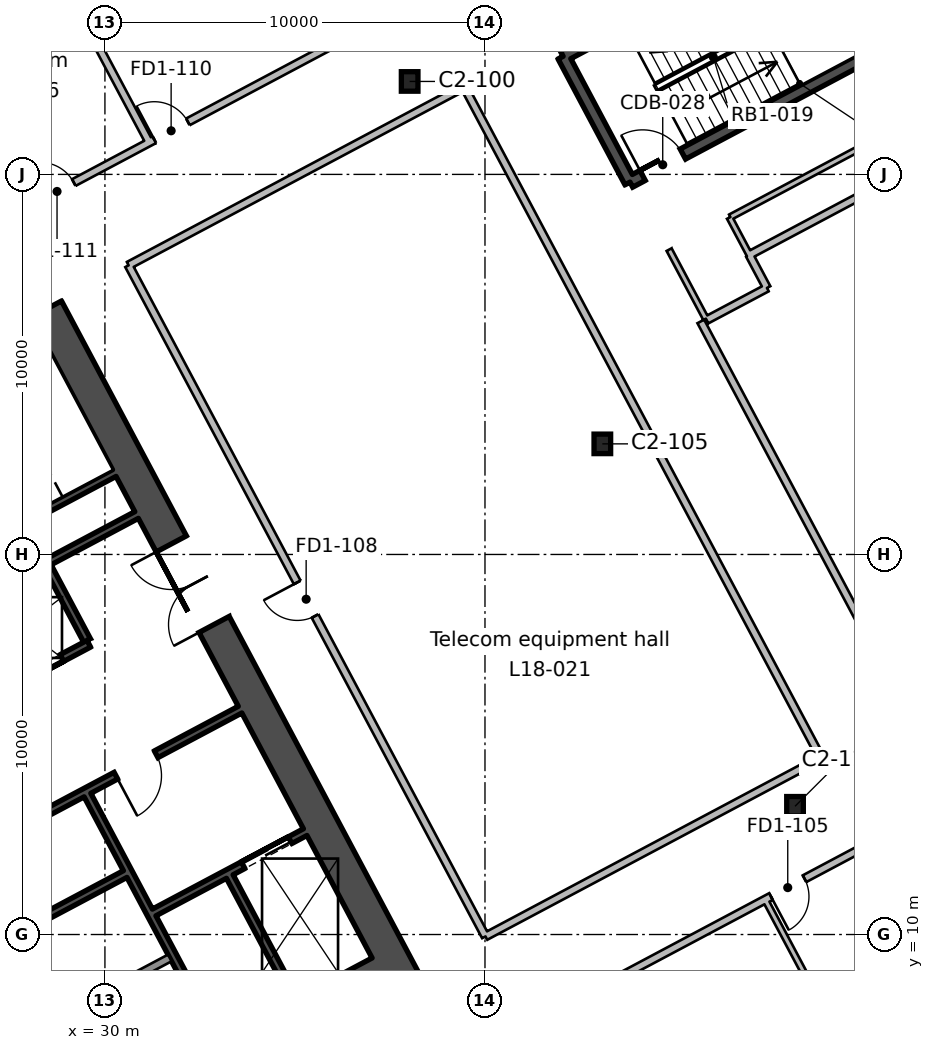
"""IFC4 building model, lengths in metres.
Left out: names, types, materials, properties, quantities, classifications, styles, units other than length and angle.
Written with IfcOpenShell. Run it as: python <this file> out.ifc"""

import sys

from ifc_helpers import new_model, si_unit, direction, frame, frame_2d, origin, origin_2d, place, context, subcontext, project, spatial, rectangle, i_section, extrude, element, fill, save


model = new_model("IFC4")
c1 = context("Model", 3, precision=1e-05, world=origin(), true_north=direction((0.0, 1.0)))
c2 = subcontext(c1, "Body", "Model", "MODEL_VIEW")
j1 = project(units=[si_unit("LENGTHUNIT", "METRE"), si_unit("PLANEANGLEUNIT", "RADIAN")], contexts=[c1])
p1 = place(None, origin())
s1 = spatial("IfcSite", under=j1, at=p1, CompositionType="ELEMENT")
p2 = place(p1, origin())
s2 = spatial("IfcBuilding", under=s1, at=p2, CompositionType="ELEMENT")
p3 = place(p2, frame((0.0, 0.0, 93.8)))
s3 = spatial("IfcBuildingStorey", under=s2, at=p3, CompositionType="ELEMENT", Elevation=93.8)
for number, where, z_axis, x_axis in (
    (1, (48.158, 13.374, 0.0), (0.0, 0.0, 1.0), (1.0, 0.0, 0.0)),
    (2, (43.088, 22.91, 0.0), (0.0, 0.0, 1.0), (1.0, 0.0, 0.0)),
    (3, (38.018, 32.446, 0.0), (0.0, 0.0, 1.0), (1.0, 0.0, 0.0)),
):
    element("IfcColumn", number, at=place(p3, frame(where, z_axis=z_axis, x_axis=x_axis)), inside=s3, PredefinedType="COLUMN", context=c2, shape_type="SweptSolid", body=[
        extrude(i_section(OverallWidth=0.437, OverallDepth=0.513, WebThickness=0.061, FlangeThickness=0.097, FilletRadius=0.015, at=origin_2d()), origin(), (0.0, 0.0, 1.0), 4.6),
    ])
p4 = place(p3, frame((37.849, 8.799, 0.0), z_axis=(0.0, 0.0, 1.0), x_axis=(-0.469465789982, 0.882950662289, 0.0)))
e4 = element("IfcWall", 4, at=p4, inside=s3, PredefinedType="SHEAR", context=c2, shape_type="SweptSolid", body=[
    extrude(rectangle(XDim=20.0, YDim=0.9, at=frame_2d((10.0, 0.0))), origin(), (0.0, 0.0, 1.0), 4.6),
])
p5 = place(p4, frame((10.6, 0.0, 0.0)))
e5 = element("IfcOpeningElement", 5, at=p5, cuts=e4, PredefinedType="OPENING", context=c2, shape_type="SweptSolid", body=[
    extrude(rectangle(XDim=2.4, YDim=2.4, at=frame_2d((1.2, 1.2))), frame((0.0, 0.46, 0.0), z_axis=(0.0, -1.0, 0.0), x_axis=(1.0, 0.0, 0.0)), (0.0, 0.0, 1.0), 0.92),
])
p6 = place(p3, frame((19.405, -0.498, 0.0), z_axis=(0.0, 0.0, 1.0), x_axis=(0.88294509198, 0.469476266226, 0.0)))
e6 = element("IfcWall", 6, at=p6, inside=s3, PredefinedType="SHEAR", context=c2, shape_type="SweptSolid", body=[
    extrude(rectangle(XDim=20.2, YDim=0.9, at=frame_2d((10.1, 0.0))), origin(), (0.0, 0.0, 1.0), 4.6),
])
p7 = place(p3, frame((32.968, 7.223, 0.0), z_axis=(0.0, 0.0, 1.0), x_axis=(-0.469480409012, 0.88294288918, 0.0)))
e7 = element("IfcWall", 7, at=p7, inside=s3, PredefinedType="SHEAR", context=c2, shape_type="SweptSolid", body=[
    extrude(rectangle(XDim=7.3, YDim=0.2, at=frame_2d((3.65, 0.0))), origin(), (0.0, 0.0, 1.0), 4.6),
])
p8 = place(p3, frame((29.528, 17.739, 0.0), z_axis=(0.0, 0.0, 1.0), x_axis=(-0.469401318492, 0.882984938828, 0.0)))
e8 = element("IfcWall", 8, at=p8, inside=s3, PredefinedType="SHEAR", context=c2, shape_type="SweptSolid", body=[
    extrude(rectangle(XDim=2.2, YDim=0.2, at=frame_2d((1.1, 0.0))), origin(), (0.0, 0.0, 1.0), 4.6),
])
p9 = place(p3, frame((34.999, 8.303, 0.0), z_axis=(0.0, 0.0, 1.0), x_axis=(-0.4694665462, 0.882950260207, 0.0)))
e9 = element("IfcWall", 9, at=p9, inside=s3, PredefinedType="SHEAR", context=c2, shape_type="SweptSolid", body=[
    extrude(rectangle(XDim=3.65, YDim=0.2, at=frame_2d((1.825, 0.0))), origin(), (0.0, 0.0, 1.0), 4.6),
])
p10 = place(p3, frame((27.115, 6.942, 0.0), z_axis=(0.0, 0.0, 1.0), x_axis=(0.882934506056, 0.469496174655, 0.0)))
e10 = element("IfcWall", 10, at=p10, inside=s3, PredefinedType="SOLIDWALL", context=c2, shape_type="SweptSolid", body=[
    extrude(rectangle(XDim=5.2, YDim=0.2, at=frame_2d((2.6, 0.0))), origin(), (0.0, 0.0, 1.0), 4.6),
])
p11 = place(p3, frame((31.296, 10.581, 0.0), z_axis=(0.0, 0.0, 1.0), x_axis=(0.882960433586, 0.469447412093, 0.0)))
e11 = element("IfcWall", 11, at=p11, inside=s3, PredefinedType="SHEAR", context=c2, shape_type="SweptSolid", body=[
    extrude(rectangle(XDim=4.5, YDim=0.2, at=frame_2d((2.25, 0.0))), origin(), (0.0, 0.0, 1.0), 4.6),
])
p12 = place(p11, frame((2.65, 0.0, 0.0)))
e12 = element("IfcOpeningElement", 12, at=p12, cuts=e11, PredefinedType="OPENING", context=c2, shape_type="SweptSolid", body=[
    extrude(rectangle(XDim=1.4, YDim=2.4, at=frame_2d((0.7, 1.2))), frame((0.0, 0.11, 0.0), z_axis=(0.0, -1.0, 0.0), x_axis=(1.0, 0.0, 0.0)), (0.0, 0.0, 1.0), 0.22),
])
p13 = place(p3, frame((25.941, 9.15, 0.0), z_axis=(0.0, 0.0, 1.0), x_axis=(0.882953967957, 0.469459572775, 0.0)))
e13 = element("IfcWall", 13, at=p13, inside=s3, PredefinedType="SHEAR", context=c2, shape_type="SweptSolid", body=[
    extrude(rectangle(XDim=5.2, YDim=0.2, at=frame_2d((2.6, 0.0))), origin(), (0.0, 0.0, 1.0), 4.6),
])
p14 = place(p3, frame((24.726, 11.222, 0.0), z_axis=(0.0, 0.0, 1.0), x_axis=(0.882940221191, 0.469485426614, 0.0)))
e14 = element("IfcWall", 14, at=p14, inside=s3, PredefinedType="SHEAR", context=c2, shape_type="SweptSolid", body=[
    extrude(rectangle(XDim=10.0, YDim=0.2, at=frame_2d((5.0, 0.0))), origin(), (0.0, 0.0, 1.0), 4.6),
])
p15 = place(p14, frame((6.3, 0.0, 0.0)))
e15 = element("IfcOpeningElement", 15, at=p15, cuts=e14, PredefinedType="OPENING", context=c2, shape_type="SweptSolid", body=[
    extrude(rectangle(XDim=1.2, YDim=2.1, at=frame_2d((0.6, 1.05))), frame((0.0, 0.11, 0.0), z_axis=(0.0, -1.0, 0.0), x_axis=(1.0, 0.0, 0.0)), (0.0, 0.0, 1.0), 0.22),
])
p16 = place(p14, frame((0.36, 0.0, 0.0)))
e16 = element("IfcOpeningElement", 16, at=p16, cuts=e14, PredefinedType="OPENING", context=c2, shape_type="SweptSolid", body=[
    extrude(rectangle(XDim=0.9, YDim=2.1, at=frame_2d((0.45, 1.05))), frame((0.0, 0.11, 0.0), z_axis=(0.0, -1.0, 0.0), x_axis=(1.0, 0.0, 0.0)), (0.0, 0.0, 1.0), 0.22),
])
p17 = place(p14, frame((3.06, 0.0, 0.0)))
e17 = element("IfcOpeningElement", 17, at=p17, cuts=e14, PredefinedType="OPENING", context=c2, shape_type="SweptSolid", body=[
    extrude(rectangle(XDim=0.9, YDim=2.1, at=frame_2d((0.45, 1.05))), frame((0.0, 0.11, 0.0), z_axis=(0.0, -1.0, 0.0), x_axis=(1.0, 0.0, 0.0)), (0.0, 0.0, 1.0), 0.22),
])
p18 = place(p3, frame((24.807, 15.116, 0.0), z_axis=(0.0, 0.0, 1.0), x_axis=(0.882942972946, 0.469480251476, 0.0)))
e18 = element("IfcWall", 18, at=p18, inside=s3, PredefinedType="SHEAR", context=c2, shape_type="SweptSolid", body=[
    extrude(rectangle(XDim=5.4, YDim=0.2, at=frame_2d((2.7, 0.0))), origin(), (0.0, 0.0, 1.0), 4.6),
])
p19 = place(p18, frame((0.8, 0.0, 0.0)))
e19 = element("IfcOpeningElement", 19, at=p19, cuts=e18, PredefinedType="OPENING", context=c2, shape_type="SweptSolid", body=[
    extrude(rectangle(XDim=1.1, YDim=2.1, at=frame_2d((0.55, 1.05))), frame((0.0, 0.11, 0.0), z_axis=(0.0, -1.0, 0.0), x_axis=(1.0, 0.0, 0.0)), (0.0, 0.0, 1.0), 0.22),
])
p20 = place(p18, frame((3.5, 0.0, 0.0)))
e20 = element("IfcOpeningElement", 20, at=p20, cuts=e18, PredefinedType="OPENING", context=c2, shape_type="SweptSolid", body=[
    extrude(rectangle(XDim=1.1, YDim=2.1, at=frame_2d((0.55, 1.05))), frame((0.0, 0.11, 0.0), z_axis=(0.0, -1.0, 0.0), x_axis=(1.0, 0.0, 0.0)), (0.0, 0.0, 1.0), 0.22),
])
p21 = place(p3, frame((23.769, 17.282, 0.0), z_axis=(0.0, 0.0, 1.0), x_axis=(0.882940221191, 0.469485426614, 0.0)))
e21 = element("IfcWall", 21, at=p21, inside=s3, PredefinedType="SHEAR", context=c2, shape_type="SweptSolid", body=[
    extrude(rectangle(XDim=8.0, YDim=0.2, at=frame_2d((4.0, 0.0))), origin(), (0.0, 0.0, 1.0), 4.6),
])
p22 = place(p3, frame((23.182, 18.385, 0.0), z_axis=(0.0, 0.0, 1.0), x_axis=(0.88295287151, 0.469461634952, 0.0)))
e22 = element("IfcWall", 22, at=p22, inside=s3, PredefinedType="SHEAR", context=c2, shape_type="SweptSolid", body=[
    extrude(rectangle(XDim=8.0, YDim=0.2, at=frame_2d((4.0, 0.0))), origin(), (0.0, 0.0, 1.0), 4.6),
])
p23 = place(p3, frame((51.145, 33.693, 0.0), z_axis=(0.0, 0.0, 1.0), x_axis=(-0.882945809314, -0.469474917132, 0.0)))
e23 = element("IfcWall", 23, at=p23, inside=s3, PredefinedType="SHEAR", context=c2, shape_type="SweptSolid", body=[
    extrude(rectangle(XDim=8.3, YDim=0.3, at=frame_2d((4.15, 0.0))), origin(), (0.0, 0.0, 1.0), 4.6),
])
p24 = place(p23, frame((6.725, 0.0, 0.0)))
e24 = element("IfcOpeningElement", 24, at=p24, cuts=e23, PredefinedType="OPENING", context=c2, shape_type="SweptSolid", body=[
    extrude(rectangle(XDim=1.2, YDim=2.1, at=frame_2d((0.6, 1.05))), frame((0.0, 0.16, 0.0), z_axis=(0.0, -1.0, 0.0), x_axis=(1.0, 0.0, 0.0)), (0.0, 0.0, 1.0), 0.32),
])
p25 = place(p3, frame((43.816, 29.796, 0.0), z_axis=(0.0, 0.0, 1.0), x_axis=(-0.46946936446, 0.882948761726, 0.0)))
e25 = element("IfcWall", 25, at=p25, inside=s3, PredefinedType="SHEAR", context=c2, shape_type="SweptSolid", body=[
    extrude(rectangle(XDim=3.75, YDim=0.3, at=frame_2d((1.875, 0.0))), origin(), (0.0, 0.0, 1.0), 4.6),
])
p26 = place(p3, frame((42.055, 33.107, 0.0), z_axis=(0.0, 0.0, 1.0), x_axis=(0.882945809314, 0.469474917132, 0.0)))
e26 = element("IfcWall", 26, at=p26, inside=s3, PredefinedType="SHEAR", context=c2, shape_type="SweptSolid", body=[
    extrude(rectangle(XDim=8.3, YDim=0.3, at=frame_2d((4.15, 0.0))), origin(), (0.0, 0.0, 1.0), 4.6),
])
p27 = place(p3, frame((0.0, 14.27, 0.0), z_axis=(0.0, 0.0, 1.0), x_axis=(0.882946949892, 0.46947277203, 0.0)))
e27 = element("IfcWall", 27, at=p27, inside=s3, PredefinedType="PARTITIONING", context=c2, shape_type="SweptSolid", body=[
    extrude(rectangle(XDim=65.501, YDim=0.2, at=frame_2d((32.75, 0.0))), origin(), (0.0, 0.0, 1.0), 4.2),
])
p28 = place(p27, frame((35.45, 0.0, 0.0)))
e28 = element("IfcOpeningElement", 28, at=p28, cuts=e27, PredefinedType="OPENING", context=c2, shape_type="SweptSolid", body=[
    extrude(rectangle(XDim=1.0, YDim=2.1, at=frame_2d((0.5, 1.05))), frame((0.0, 0.11, 0.0), z_axis=(0.0, -1.0, 0.0), x_axis=(1.0, 0.0, 0.0)), (0.0, 0.0, 1.0), 0.22),
])
p29 = place(p27, frame((32.05, 0.0, 0.0)))
e29 = element("IfcOpeningElement", 29, at=p29, cuts=e27, PredefinedType="OPENING", context=c2, shape_type="SweptSolid", body=[
    extrude(rectangle(XDim=1.0, YDim=2.1, at=frame_2d((0.5, 1.05))), frame((0.0, 0.11, 0.0), z_axis=(0.0, -1.0, 0.0), x_axis=(1.0, 0.0, 0.0)), (0.0, 0.0, 1.0), 0.22),
])
p30 = place(p27, frame((29.65, 0.0, 0.0)))
e30 = element("IfcOpeningElement", 30, at=p30, cuts=e27, PredefinedType="OPENING", context=c2, shape_type="SweptSolid", body=[
    extrude(rectangle(XDim=1.0, YDim=2.1, at=frame_2d((0.5, 1.05))), frame((0.0, 0.11, 0.0), z_axis=(0.0, -1.0, 0.0), x_axis=(1.0, 0.0, 0.0)), (0.0, 0.0, 1.0), 0.22),
])
p31 = place(p27, frame((13.85, 0.0, 0.0)))
e31 = element("IfcOpeningElement", 31, at=p31, cuts=e27, PredefinedType="OPENING", context=c2, shape_type="SweptSolid", body=[
    extrude(rectangle(XDim=1.0, YDim=2.1, at=frame_2d((0.5, 1.05))), frame((0.0, 0.11, 0.0), z_axis=(0.0, -1.0, 0.0), x_axis=(1.0, 0.0, 0.0)), (0.0, 0.0, 1.0), 0.22),
])
p32 = place(p3, frame((57.105, 16.093, 0.0), z_axis=(0.0, 0.0, 1.0), x_axis=(-0.882946553343, -0.469473517827, 0.0)))
e32 = element("IfcWall", 32, at=p32, inside=s3, PredefinedType="PARTITIONING", context=c2, shape_type="SweptSolid", body=[
    extrude(rectangle(XDim=49.272, YDim=0.2, at=frame_2d((24.636, 0.0))), origin(), (0.0, 0.0, 1.0), 4.2),
])
p33 = place(p32, frame((27.75, 0.0, 0.0)))
e33 = element("IfcOpeningElement", 33, at=p33, cuts=e32, PredefinedType="OPENING", context=c2, shape_type="SweptSolid", body=[
    extrude(rectangle(XDim=1.0, YDim=2.1, at=frame_2d((0.5, 1.05))), frame((0.0, 0.11, 0.0), z_axis=(0.0, -1.0, 0.0), x_axis=(1.0, 0.0, 0.0)), (0.0, 0.0, 1.0), 0.22),
])
p34 = place(p32, frame((24.15, 0.0, 0.0)))
e34 = element("IfcOpeningElement", 34, at=p34, cuts=e32, PredefinedType="OPENING", context=c2, shape_type="SweptSolid", body=[
    extrude(rectangle(XDim=1.0, YDim=2.1, at=frame_2d((0.5, 1.05))), frame((0.0, 0.11, 0.0), z_axis=(0.0, -1.0, 0.0), x_axis=(1.0, 0.0, 0.0)), (0.0, 0.0, 1.0), 0.22),
])
p35 = place(p32, frame((9.85, 0.0, 0.0)))
e35 = element("IfcOpeningElement", 35, at=p35, cuts=e32, PredefinedType="OPENING", context=c2, shape_type="SweptSolid", body=[
    extrude(rectangle(XDim=1.0, YDim=2.1, at=frame_2d((0.5, 1.05))), frame((0.0, 0.11, 0.0), z_axis=(0.0, -1.0, 0.0), x_axis=(1.0, 0.0, 0.0)), (0.0, 0.0, 1.0), 0.22),
])
p36 = place(p3, frame((31.16, 30.858, 0.0), z_axis=(0.0, 0.0, 1.0), x_axis=(-0.469406117912, 0.882982387404, 0.0)))
e36 = element("IfcWall", 36, at=p36, inside=s3, PredefinedType="PARTITIONING", context=c2, shape_type="SweptSolid", body=[
    extrude(rectangle(XDim=5.383, YDim=0.2, at=frame_2d((2.691, 0.0))), origin(), (0.0, 0.0, 1.0), 4.2),
])
p37 = place(p3, frame((47.372, 10.918, 0.0), z_axis=(0.0, 0.0, 1.0), x_axis=(0.469298440423, -0.883039621884, 0.0)))
e37 = element("IfcWall", 37, at=p37, inside=s3, PredefinedType="PARTITIONING", context=c2, shape_type="SweptSolid", body=[
    extrude(rectangle(XDim=8.6, YDim=0.15, at=frame_2d((4.3, 0.0))), origin(), (0.0, 0.0, 1.0), 4.2),
])
p38 = place(p3, frame((45.811, 26.202, 0.0), z_axis=(0.0, 0.0, 1.0), x_axis=(-0.469172559653, 0.883106510716, 0.0)))
e38 = element("IfcWall", 38, at=p38, inside=s3, PredefinedType="PARTITIONING", context=c2, shape_type="SweptSolid", body=[
    extrude(rectangle(XDim=2.06, YDim=0.15, at=frame_2d((1.03, 0.0))), origin(), (0.0, 0.0, 1.0), 4.2),
])
p39 = place(p3, frame((45.679, 26.132, 0.0), z_axis=(0.0, 0.0, 1.0), x_axis=(0.469471943685, -0.882947390331, 0.0)))
e39 = element("IfcWall", 39, at=p39, inside=s3, PredefinedType="PARTITIONING", context=c2, shape_type="SweptSolid", body=[
    extrude(rectangle(XDim=11.628, YDim=0.2, at=frame_2d((5.814, 0.0))), origin(), (0.0, 0.0, 1.0), 4.2),
])
p40 = place(p3, frame((46.958, 27.881, 0.0), z_axis=(0.0, 0.0, 1.0), x_axis=(0.469300305861, -0.883038630479, 0.0)))
e40 = element("IfcWall", 40, at=p40, inside=s3, PredefinedType="PARTITIONING", context=c2, shape_type="SweptSolid", body=[
    extrude(rectangle(XDim=0.984, YDim=0.2, at=frame_2d((0.492, 0.0))), origin(), (0.0, 0.0, 1.0), 4.2),
])
p41 = place(p3, frame((47.42, 27.012, 0.0), z_axis=(0.0, 0.0, 1.0), x_axis=(-0.88313680222, -0.46911553861, 0.0)))
e41 = element("IfcWall", 41, at=p41, inside=s3, PredefinedType="PARTITIONING", context=c2, shape_type="SweptSolid", body=[
    extrude(rectangle(XDim=1.799, YDim=0.2, at=frame_2d((0.899, 0.0))), origin(), (0.0, 0.0, 1.0), 4.2),
])
p42 = place(p3, frame((52.239, 31.953, 0.0), z_axis=(0.0, 0.0, 1.0), x_axis=(-0.882908561856, -0.469544962065, 0.0)))
e42 = element("IfcWall", 42, at=p42, inside=s3, PredefinedType="PARTITIONING", context=c2, shape_type="SweptSolid", body=[
    extrude(rectangle(XDim=6.549, YDim=0.15, at=frame_2d((3.274, 0.0))), origin(), (0.0, 0.0, 1.0), 4.2),
])
p43 = place(p3, frame((46.434, 28.866, 0.0), z_axis=(0.0, 0.0, 1.0), x_axis=(0.469656526593, -0.882849221005, 0.0)))
e43 = element("IfcWall", 43, at=p43, inside=s3, PredefinedType="PARTITIONING", context=c2, shape_type="SweptSolid", body=[
    extrude(rectangle(XDim=1.115, YDim=0.15, at=frame_2d((0.558, 0.0))), origin(), (0.0, 0.0, 1.0), 4.2),
])
p44 = place(p3, frame((62.542, 36.166, 0.0), z_axis=(0.0, 0.0, 1.0), x_axis=(-0.8829766993, -0.469416817438, 0.0)))
e44 = element("IfcWall", 44, at=p44, inside=s3, PredefinedType="PARTITIONING", context=c2, shape_type="SweptSolid", body=[
    extrude(rectangle(XDim=17.649, YDim=0.2, at=frame_2d((8.825, 0.0))), origin(), (0.0, 0.0, 1.0), 4.2),
])
p45 = place(p3, frame((30.623, 27.608, 0.0), z_axis=(0.0, 0.0, 1.0), x_axis=(0.882940863385, 0.469484218867, 0.0)))
e45 = element("IfcWall", 45, at=p45, inside=s3, PredefinedType="PARTITIONING", context=c2, shape_type="SweptSolid", body=[
    extrude(rectangle(XDim=10.0, YDim=0.2, at=frame_2d((5.0, 0.0))), origin(), (0.0, 0.0, 1.0), 4.2),
])
p46 = place(p3, frame((39.453, 32.303, 0.0), z_axis=(0.0, 0.0, 1.0), x_axis=(0.469461333319, -0.882953031887, 0.0)))
e46 = element("IfcWall", 46, at=p46, inside=s3, PredefinedType="PARTITIONING", context=c2, shape_type="SweptSolid", body=[
    extrude(rectangle(XDim=20.0, YDim=0.2, at=frame_2d((10.0, 0.0))), origin(), (0.0, 0.0, 1.0), 4.2),
])
p47 = place(p3, frame((48.842, 14.644, 0.0), z_axis=(0.0, 0.0, 1.0), x_axis=(-0.882924718888, -0.46951457994, 0.0)))
e47 = element("IfcWall", 47, at=p47, inside=s3, PredefinedType="PARTITIONING", context=c2, shape_type="SweptSolid", body=[
    extrude(rectangle(XDim=10.0, YDim=0.2, at=frame_2d((5.0, 0.0))), origin(), (0.0, 0.0, 1.0), 4.2),
])
p48 = place(p3, frame((40.013, 9.949, 0.0), z_axis=(0.0, 0.0, 1.0), x_axis=(-0.469489882812, 0.882937851685, 0.0)))
e48 = element("IfcWall", 48, at=p48, inside=s3, PredefinedType="PARTITIONING", context=c2, shape_type="SweptSolid", body=[
    extrude(rectangle(XDim=20.0, YDim=0.2, at=frame_2d((10.0, 0.0))), origin(), (0.0, 0.0, 1.0), 4.2),
])
p49 = place(p48, frame((9.55, 0.0, 0.0)))
e49 = element("IfcOpeningElement", 49, at=p49, cuts=e48, PredefinedType="OPENING", context=c2, shape_type="SweptSolid", body=[
    extrude(rectangle(XDim=1.0, YDim=2.1, at=frame_2d((0.5, 1.05))), frame((0.0, 0.11, 0.0), z_axis=(0.0, -1.0, 0.0), x_axis=(1.0, 0.0, 0.0)), (0.0, 0.0, 1.0), 0.22),
])
p50 = place(p5, origin())
e50 = element("IfcDoor", 50, at=p50, inside=s3, OperationType="DOUBLE_DOOR_SINGLE_SWING", PredefinedType="DOOR", context=c2, shape_type="SweptSolid", body=[
    extrude(rectangle(XDim=2.4, YDim=2.4, at=frame_2d((1.2, 1.2))), frame((0.0, 0.025, 0.0), z_axis=(0.0, -1.0, 0.0), x_axis=(1.0, 0.0, 0.0)), (0.0, 0.0, 1.0), 0.05),
])
fill(e5, e50)
p51 = place(p15, frame((1.2, 0.0, 0.0), z_axis=(0.0, 0.0, 1.0), x_axis=(-1.0, 0.0, 0.0)))
e51 = element("IfcDoor", 51, at=p51, inside=s3, OperationType="SINGLE_SWING_RIGHT", PredefinedType="DOOR", context=c2, shape_type="SweptSolid", body=[
    extrude(rectangle(XDim=1.2, YDim=2.1, at=frame_2d((0.6, 1.05))), frame((0.0, 0.025, 0.0), z_axis=(0.0, -1.0, 0.0), x_axis=(1.0, 0.0, 0.0)), (0.0, 0.0, 1.0), 0.05),
])
fill(e15, e51)
p52 = place(p20, origin())
e52 = element("IfcDoor", 52, at=p52, inside=s3, OperationType="DOUBLE_DOOR_SLIDING", PredefinedType="DOOR", context=c2, shape_type="SweptSolid", body=[
    extrude(rectangle(XDim=1.1, YDim=2.1, at=frame_2d((0.55, 1.05))), frame((0.0, 0.025, 0.0), z_axis=(0.0, -1.0, 0.0), x_axis=(1.0, 0.0, 0.0)), (0.0, 0.0, 1.0), 0.05),
])
fill(e20, e52)
p53 = place(p12, origin())
e53 = element("IfcDoor", 53, at=p53, inside=s3, OperationType="DOUBLE_DOOR_SLIDING", PredefinedType="DOOR", context=c2, shape_type="SweptSolid", body=[
    extrude(rectangle(XDim=1.4, YDim=2.4, at=frame_2d((0.7, 1.2))), frame((0.0, 0.025, 0.0), z_axis=(0.0, -1.0, 0.0), x_axis=(1.0, 0.0, 0.0)), (0.0, 0.0, 1.0), 0.05),
])
fill(e12, e53)
p54 = place(p24, frame((1.2, 0.0, 0.0), z_axis=(0.0, 0.0, 1.0), x_axis=(-1.0, 0.0, 0.0)))
e54 = element("IfcDoor", 54, at=p54, inside=s3, OperationType="SINGLE_SWING_LEFT", PredefinedType="DOOR", context=c2, shape_type="SweptSolid", body=[
    extrude(rectangle(XDim=1.2, YDim=2.1, at=frame_2d((0.6, 1.05))), frame((0.0, 0.025, 0.0), z_axis=(0.0, -1.0, 0.0), x_axis=(1.0, 0.0, 0.0)), (0.0, 0.0, 1.0), 0.05),
])
fill(e24, e54)
p55 = place(p28, origin())
e55 = element("IfcDoor", 55, at=p55, inside=s3, OperationType="SINGLE_SWING_LEFT", PredefinedType="DOOR", context=c2, shape_type="SweptSolid", body=[
    extrude(rectangle(XDim=1.0, YDim=2.1, at=frame_2d((0.5, 1.05))), frame((0.0, 0.025, 0.0), z_axis=(0.0, -1.0, 0.0), x_axis=(1.0, 0.0, 0.0)), (0.0, 0.0, 1.0), 0.05),
])
fill(e28, e55)
p56 = place(p29, origin())
e56 = element("IfcDoor", 56, at=p56, inside=s3, OperationType="SINGLE_SWING_LEFT", PredefinedType="DOOR", context=c2, shape_type="SweptSolid", body=[
    extrude(rectangle(XDim=1.0, YDim=2.1, at=frame_2d((0.5, 1.05))), frame((0.0, 0.025, 0.0), z_axis=(0.0, -1.0, 0.0), x_axis=(1.0, 0.0, 0.0)), (0.0, 0.0, 1.0), 0.05),
])
fill(e29, e56)
p57 = place(p35, origin())
e57 = element("IfcDoor", 57, at=p57, inside=s3, OperationType="SINGLE_SWING_RIGHT", PredefinedType="DOOR", context=c2, shape_type="SweptSolid", body=[
    extrude(rectangle(XDim=1.0, YDim=2.1, at=frame_2d((0.5, 1.05))), frame((0.0, 0.025, 0.0), z_axis=(0.0, -1.0, 0.0), x_axis=(1.0, 0.0, 0.0)), (0.0, 0.0, 1.0), 0.05),
])
fill(e35, e57)
p58 = place(p49, origin())
e58 = element("IfcDoor", 58, at=p58, inside=s3, OperationType="SINGLE_SWING_RIGHT", PredefinedType="DOOR", context=c2, shape_type="SweptSolid", body=[
    extrude(rectangle(XDim=1.0, YDim=2.1, at=frame_2d((0.5, 1.05))), frame((0.0, 0.025, 0.0), z_axis=(0.0, -1.0, 0.0), x_axis=(1.0, 0.0, 0.0)), (0.0, 0.0, 1.0), 0.05),
])
fill(e49, e58)
save(model, sys.argv[1])
